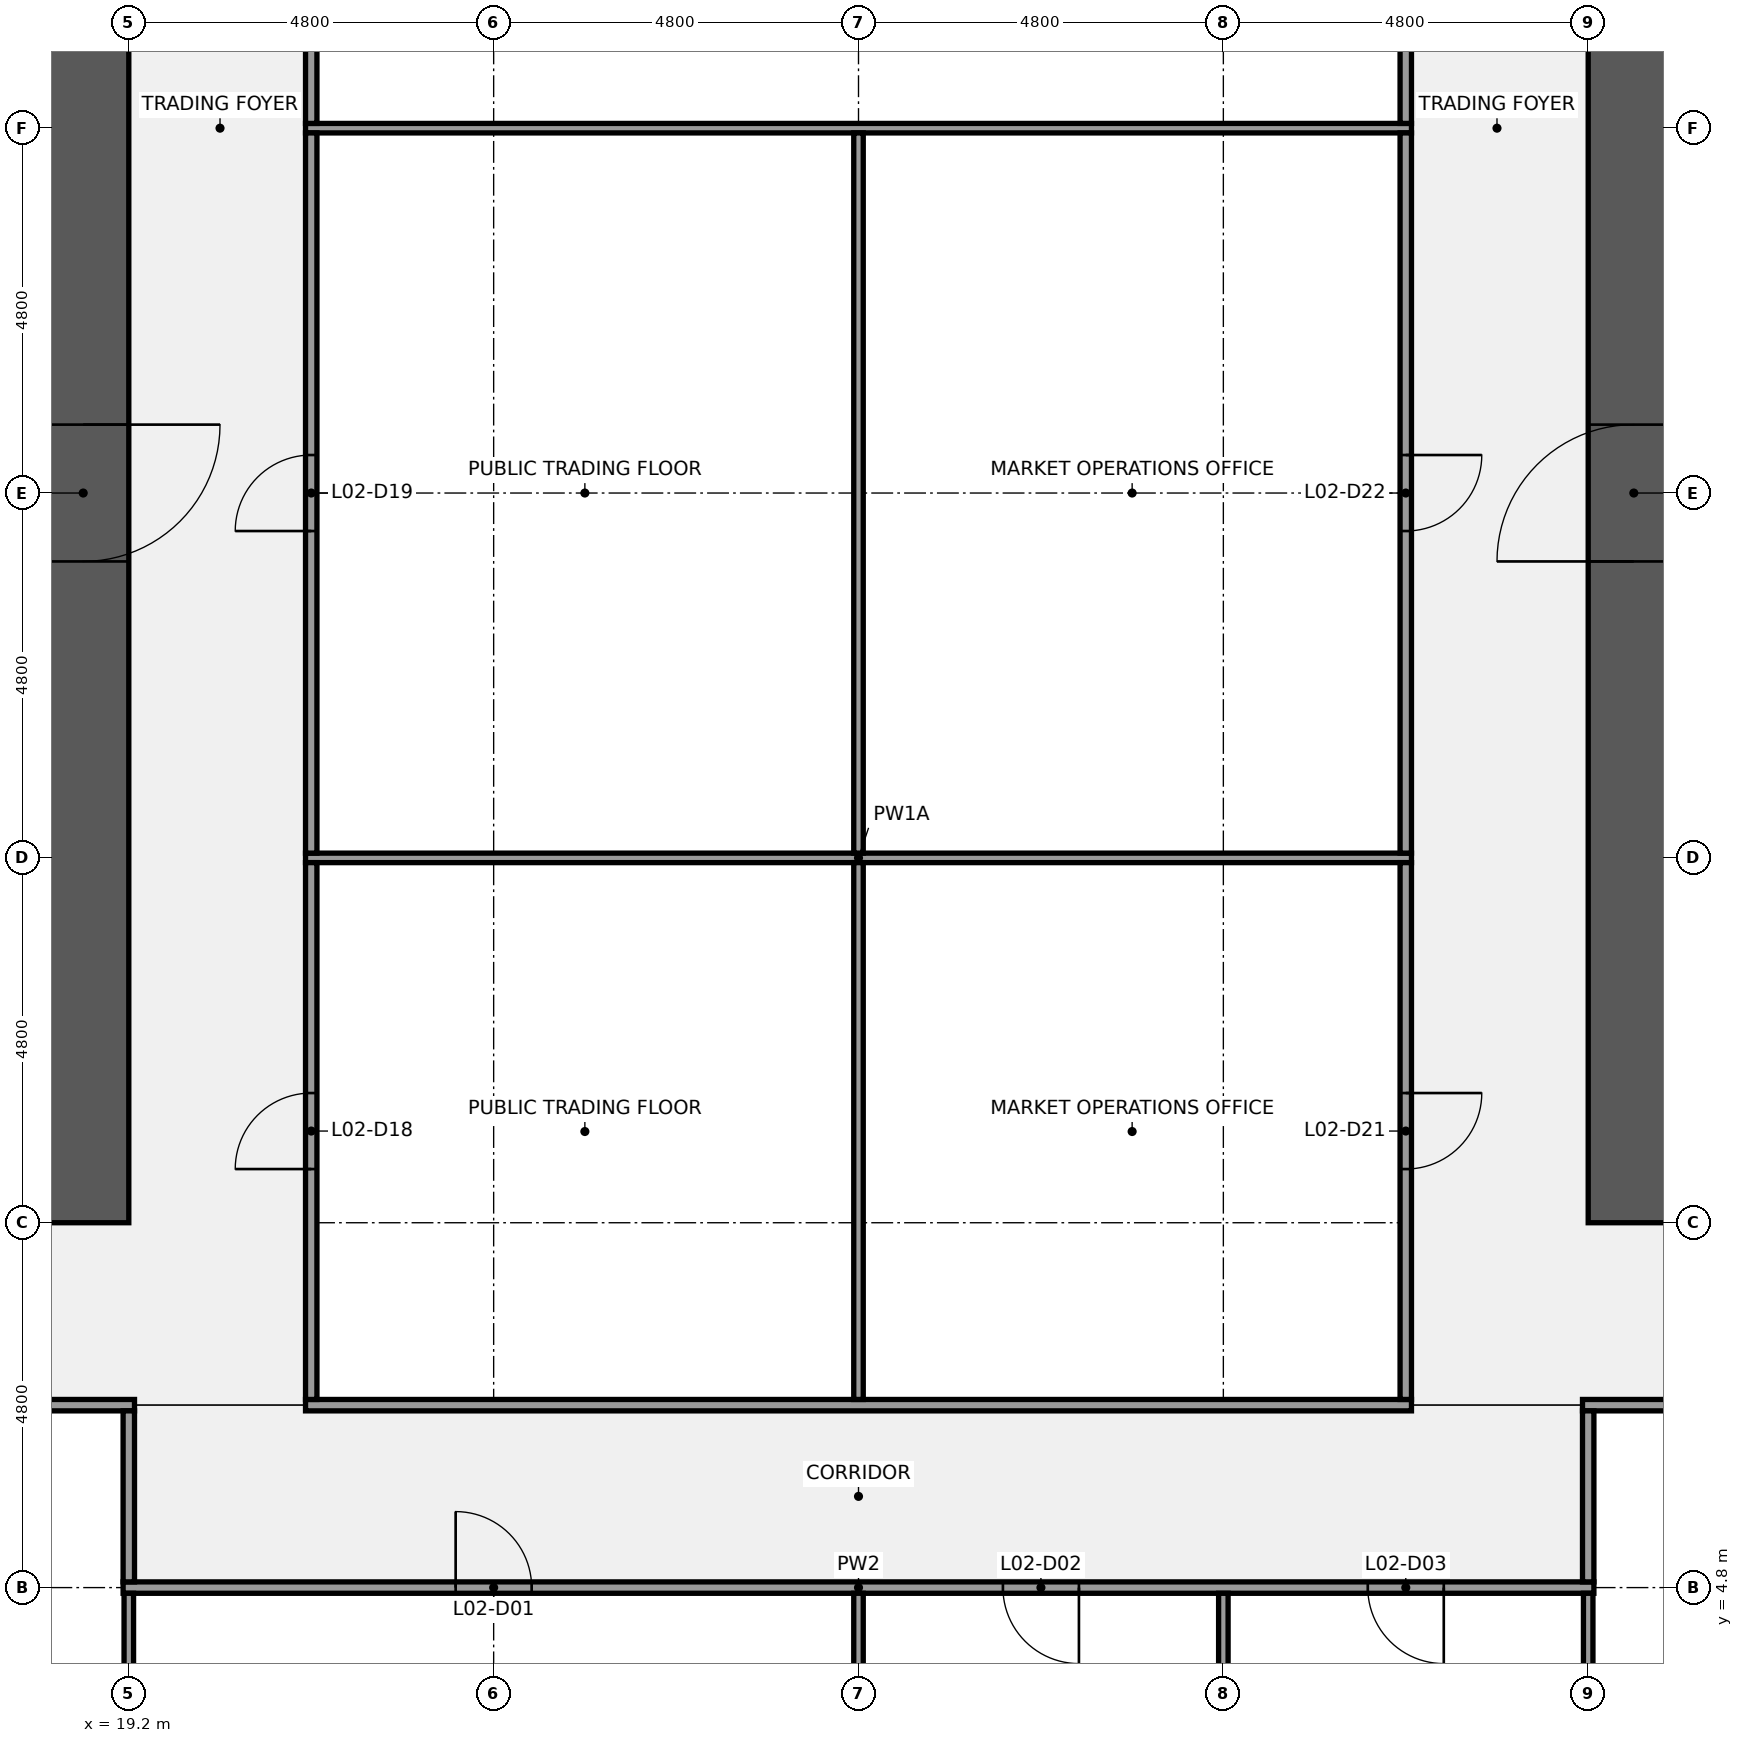
"""IFC4 building model, lengths in metres.
Left out: names, types, materials, properties, quantities, classifications, styles, units other than length and angle.
Written with IfcOpenShell. Run it as: python <this file> out.ifc"""

import sys

from ifc_helpers import new_model, si_unit, direction, frame, frame_2d, origin, place, context, subcontext, project, spatial, rectangle, extrude, element, fill, save


model = new_model("IFC4")
c1 = context("Model", 3, precision=1e-05, world=origin(), true_north=direction((0.0, 1.0)))
c2 = subcontext(c1, "Body", "Model", "MODEL_VIEW")
j1 = project(units=[si_unit("LENGTHUNIT", "METRE"), si_unit("PLANEANGLEUNIT", "RADIAN")], contexts=[c1])
p1 = place(None, origin())
s1 = spatial("IfcSite", under=j1, at=p1, CompositionType="ELEMENT")
p2 = place(p1, origin())
s2 = spatial("IfcBuilding", under=s1, at=p2, CompositionType="ELEMENT")
p3 = place(p2, frame((0.0, 0.0, 17.0)))
s3 = spatial("IfcBuildingStorey", under=s2, at=p3, CompositionType="ELEMENT", Elevation=17.0)
p4 = place(p3, frame((18.6, 38.4, 0.0), z_axis=(0.0, 0.0, 1.0), x_axis=(0.0, -1.0, 0.0)))
e1 = element("IfcWall", 1, at=p4, inside=s3, PredefinedType="SHEAR", context=c2, shape_type="SweptSolid", body=[
    extrude(rectangle(XDim=28.8, YDim=1.2, at=frame_2d((14.4, 0.0))), origin(), (0.0, 0.0, 1.0), 4.24),
])
p5 = place(p4, frame((18.3, 0.0, 0.0)))
e2 = element("IfcOpeningElement", 2, at=p5, cuts=e1, PredefinedType="OPENING", context=c2, shape_type="SweptSolid", body=[
    extrude(rectangle(XDim=1.8, YDim=2.1, at=frame_2d((0.9, 1.05))), frame((0.0, 0.61, 0.0), z_axis=(0.0, -1.0, 0.0), x_axis=(1.0, 0.0, 0.0)), (0.0, 0.0, 1.0), 1.22),
])
p6 = place(p4, frame((8.7, 0.0, 0.0)))
e3 = element("IfcOpeningElement", 3, at=p6, cuts=e1, PredefinedType="OPENING", context=c2, shape_type="SweptSolid", body=[
    extrude(rectangle(XDim=1.8, YDim=2.1, at=frame_2d((0.9, 1.05))), frame((0.0, 0.61, 0.0), z_axis=(0.0, -1.0, 0.0), x_axis=(1.0, 0.0, 0.0)), (0.0, 0.0, 1.0), 1.22),
])
p7 = place(p3, frame((39.0, 9.6, 0.0), z_axis=(0.0, 0.0, 1.0), x_axis=(0.0, 1.0, 0.0)))
e4 = element("IfcWall", 4, at=p7, inside=s3, PredefinedType="SHEAR", context=c2, shape_type="SweptSolid", body=[
    extrude(rectangle(XDim=28.8, YDim=1.2, at=frame_2d((14.4, 0.0))), origin(), (0.0, 0.0, 1.0), 4.24),
])
p8 = place(p7, frame((8.7, 0.0, 0.0)))
e5 = element("IfcOpeningElement", 5, at=p8, cuts=e4, PredefinedType="OPENING", context=c2, shape_type="SweptSolid", body=[
    extrude(rectangle(XDim=1.8, YDim=2.1, at=frame_2d((0.9, 1.05))), frame((0.0, 0.61, 0.0), z_axis=(0.0, -1.0, 0.0), x_axis=(1.0, 0.0, 0.0)), (0.0, 0.0, 1.0), 1.22),
])
p9 = place(p7, frame((18.3, 0.0, 0.0)))
e6 = element("IfcOpeningElement", 6, at=p9, cuts=e4, PredefinedType="OPENING", context=c2, shape_type="SweptSolid", body=[
    extrude(rectangle(XDim=1.8, YDim=2.1, at=frame_2d((0.9, 1.05))), frame((0.0, 0.61, 0.0), z_axis=(0.0, -1.0, 0.0), x_axis=(1.0, 0.0, 0.0)), (0.0, 0.0, 1.0), 1.22),
])
p10 = place(p3, frame((19.125, 4.8, 0.0), z_axis=(0.0, 0.0, 1.0), x_axis=(1.0, 0.0, 0.0)))
e7 = element("IfcWall", 7, at=p10, inside=s3, PredefinedType="PARTITIONING", context=c2, shape_type="SweptSolid", body=[
    extrude(rectangle(XDim=19.35, YDim=0.15, at=frame_2d((9.675, 0.0))), origin(), (0.0, 0.0, 1.0), 3.25),
])
p11 = place(p10, frame((4.375, 0.0, 0.0)))
e8 = element("IfcOpeningElement", 8, at=p11, cuts=e7, PredefinedType="OPENING", context=c2, shape_type="SweptSolid", body=[
    extrude(rectangle(XDim=1.0, YDim=2.1, at=frame_2d((0.5, 1.05))), frame((0.0, 0.085, 0.0), z_axis=(0.0, -1.0, 0.0), x_axis=(1.0, 0.0, 0.0)), (0.0, 0.0, 1.0), 0.17),
])
p12 = place(p10, frame((11.575, 0.0, 0.0)))
e9 = element("IfcOpeningElement", 9, at=p12, cuts=e7, PredefinedType="OPENING", context=c2, shape_type="SweptSolid", body=[
    extrude(rectangle(XDim=1.0, YDim=2.1, at=frame_2d((0.5, 1.05))), frame((0.0, 0.085, 0.0), z_axis=(0.0, -1.0, 0.0), x_axis=(1.0, 0.0, 0.0)), (0.0, 0.0, 1.0), 0.17),
])
p13 = place(p10, frame((16.375, 0.0, 0.0)))
e10 = element("IfcOpeningElement", 10, at=p13, cuts=e7, PredefinedType="OPENING", context=c2, shape_type="SweptSolid", body=[
    extrude(rectangle(XDim=1.0, YDim=2.1, at=frame_2d((0.5, 1.05))), frame((0.0, 0.085, 0.0), z_axis=(0.0, -1.0, 0.0), x_axis=(1.0, 0.0, 0.0)), (0.0, 0.0, 1.0), 0.17),
])
p14 = place(p3, frame((9.525, 7.2, 0.0), z_axis=(0.0, 0.0, 1.0), x_axis=(1.0, 0.0, 0.0)))
e11 = element("IfcWall", 11, at=p14, inside=s3, PredefinedType="PARTITIONING", context=c2, shape_type="SweptSolid", body=[
    extrude(rectangle(XDim=9.75, YDim=0.15, at=frame_2d((4.875, 0.0))), origin(), (0.0, 0.0, 1.0), 3.25),
])
p15 = place(p14, frame((4.375, 0.0, 0.0)))
e12 = element("IfcOpeningElement", 12, at=p15, cuts=e11, PredefinedType="OPENING", context=c2, shape_type="SweptSolid", body=[
    extrude(rectangle(XDim=1.0, YDim=2.1, at=frame_2d((0.5, 1.05))), frame((0.0, 0.085, 0.0), z_axis=(0.0, -1.0, 0.0), x_axis=(1.0, 0.0, 0.0)), (0.0, 0.0, 1.0), 0.17),
])
p16 = place(p3, frame((21.525, 7.2, 0.0), z_axis=(0.0, 0.0, 1.0), x_axis=(1.0, 0.0, 0.0)))
e13 = element("IfcWall", 13, at=p16, inside=s3, PredefinedType="PARTITIONING", context=c2, shape_type="SweptSolid", body=[
    extrude(rectangle(XDim=14.55, YDim=0.15, at=frame_2d((7.275, 0.0))), origin(), (0.0, 0.0, 1.0), 3.25),
])
p17 = place(p3, frame((38.325, 7.2, 0.0), z_axis=(0.0, 0.0, 1.0), x_axis=(1.0, 0.0, 0.0)))
e14 = element("IfcWall", 14, at=p17, inside=s3, PredefinedType="PARTITIONING", context=c2, shape_type="SweptSolid", body=[
    extrude(rectangle(XDim=9.75, YDim=0.15, at=frame_2d((4.875, 0.0))), origin(), (0.0, 0.0, 1.0), 3.25),
])
p18 = place(p17, frame((4.375, 0.0, 0.0)))
e15 = element("IfcOpeningElement", 15, at=p18, cuts=e14, PredefinedType="OPENING", context=c2, shape_type="SweptSolid", body=[
    extrude(rectangle(XDim=1.0, YDim=2.1, at=frame_2d((0.5, 1.05))), frame((0.0, 0.085, 0.0), z_axis=(0.0, -1.0, 0.0), x_axis=(1.0, 0.0, 0.0)), (0.0, 0.0, 1.0), 0.17),
])
for number, where, z_axis, x_axis in (
    (16, (21.525, 14.4, 0.0), (0.0, 0.0, 1.0), (1.0, 0.0, 0.0)),
    (17, (21.525, 24.0, 0.0), (0.0, 0.0, 1.0), (1.0, 0.0, 0.0)),
):
    element("IfcWall", number, at=place(p3, frame(where, z_axis=z_axis, x_axis=x_axis)), inside=s3, PredefinedType="PARTITIONING", context=c2, shape_type="SweptSolid", body=[
        extrude(rectangle(XDim=14.55, YDim=0.125, at=frame_2d((7.275, 0.0))), origin(), (0.0, 0.0, 1.0), 3.25),
    ])
p19 = place(p3, frame((19.2, 0.65, 0.0), z_axis=(0.0, 0.0, 1.0), x_axis=(0.0, 1.0, 0.0)))
e18 = element("IfcWall", 18, at=p19, inside=s3, PredefinedType="PARTITIONING", context=c2, shape_type="SweptSolid", body=[
    extrude(rectangle(XDim=4.075, YDim=0.125, at=frame_2d((2.038, 0.0))), origin(), (0.0, 0.0, 1.0), 3.25),
])
p20 = place(p3, frame((19.2, 4.875, 0.0), z_axis=(0.0, 0.0, 1.0), x_axis=(0.0, 1.0, 0.0)))
e19 = element("IfcWall", 19, at=p20, inside=s3, PredefinedType="PARTITIONING", context=c2, shape_type="SweptSolid", body=[
    extrude(rectangle(XDim=2.25, YDim=0.15, at=frame_2d((1.125, 0.0))), origin(), (0.0, 0.0, 1.0), 3.25),
])
p21 = place(p3, frame((21.6, 7.275, 0.0), z_axis=(0.0, 0.0, 1.0), x_axis=(0.0, 1.0, 0.0)))
e20 = element("IfcWall", 20, at=p21, inside=s3, PredefinedType="PARTITIONING", context=c2, shape_type="SweptSolid", body=[
    extrude(rectangle(XDim=7.062, YDim=0.15, at=frame_2d((3.531, 0.0))), origin(), (0.0, 0.0, 1.0), 3.25),
])
p22 = place(p21, frame((3.031, 0.0, 0.0)))
e21 = element("IfcOpeningElement", 21, at=p22, cuts=e20, PredefinedType="OPENING", context=c2, shape_type="SweptSolid", body=[
    extrude(rectangle(XDim=1.0, YDim=2.1, at=frame_2d((0.5, 1.05))), frame((0.0, 0.085, 0.0), z_axis=(0.0, -1.0, 0.0), x_axis=(1.0, 0.0, 0.0)), (0.0, 0.0, 1.0), 0.17),
])
p23 = place(p3, frame((21.6, 14.462, 0.0), z_axis=(0.0, 0.0, 1.0), x_axis=(0.0, 1.0, 0.0)))
e22 = element("IfcWall", 22, at=p23, inside=s3, PredefinedType="PARTITIONING", context=c2, shape_type="SweptSolid", body=[
    extrude(rectangle(XDim=9.475, YDim=0.15, at=frame_2d((4.738, 0.0))), origin(), (0.0, 0.0, 1.0), 3.25),
])
p24 = place(p23, frame((4.238, 0.0, 0.0)))
e23 = element("IfcOpeningElement", 23, at=p24, cuts=e22, PredefinedType="OPENING", context=c2, shape_type="SweptSolid", body=[
    extrude(rectangle(XDim=1.0, YDim=2.1, at=frame_2d((0.5, 1.05))), frame((0.0, 0.085, 0.0), z_axis=(0.0, -1.0, 0.0), x_axis=(1.0, 0.0, 0.0)), (0.0, 0.0, 1.0), 0.17),
])
p25 = place(p3, frame((21.6, 24.062, 0.0), z_axis=(0.0, 0.0, 1.0), x_axis=(0.0, 1.0, 0.0)))
e24 = element("IfcWall", 24, at=p25, inside=s3, PredefinedType="PARTITIONING", context=c2, shape_type="SweptSolid", body=[
    extrude(rectangle(XDim=9.475, YDim=0.15, at=frame_2d((4.738, 0.0))), origin(), (0.0, 0.0, 1.0), 3.25),
])
p26 = place(p25, frame((4.238, 0.0, 0.0)))
e25 = element("IfcOpeningElement", 25, at=p26, cuts=e24, PredefinedType="OPENING", context=c2, shape_type="SweptSolid", body=[
    extrude(rectangle(XDim=1.0, YDim=2.1, at=frame_2d((0.5, 1.05))), frame((0.0, 0.085, 0.0), z_axis=(0.0, -1.0, 0.0), x_axis=(1.0, 0.0, 0.0)), (0.0, 0.0, 1.0), 0.17),
])
p27 = place(p3, frame((28.8, 0.65, 0.0), z_axis=(0.0, 0.0, 1.0), x_axis=(0.0, 1.0, 0.0)))
e26 = element("IfcWall", 26, at=p27, inside=s3, PredefinedType="PARTITIONING", context=c2, shape_type="SweptSolid", body=[
    extrude(rectangle(XDim=4.075, YDim=0.125, at=frame_2d((2.038, 0.0))), origin(), (0.0, 0.0, 1.0), 3.25),
])
p28 = place(p3, frame((28.8, 7.275, 0.0), z_axis=(0.0, 0.0, 1.0), x_axis=(0.0, 1.0, 0.0)))
e27 = element("IfcWall", 27, at=p28, inside=s3, PredefinedType="PARTITIONING", context=c2, shape_type="SweptSolid", body=[
    extrude(rectangle(XDim=7.062, YDim=0.125, at=frame_2d((3.531, 0.0))), origin(), (0.0, 0.0, 1.0), 3.25),
])
p29 = place(p3, frame((28.8, 14.462, 0.0), z_axis=(0.0, 0.0, 1.0), x_axis=(0.0, 1.0, 0.0)))
e28 = element("IfcWall", 28, at=p29, inside=s3, PredefinedType="PARTITIONING", context=c2, shape_type="SweptSolid", body=[
    extrude(rectangle(XDim=9.475, YDim=0.125, at=frame_2d((4.738, 0.0))), origin(), (0.0, 0.0, 1.0), 3.25),
])
p30 = place(p3, frame((33.6, 0.1, 0.0), z_axis=(0.0, 0.0, 1.0), x_axis=(0.0, 1.0, 0.0)))
e29 = element("IfcWall", 29, at=p30, inside=s3, PredefinedType="PARTITIONING", context=c2, shape_type="SweptSolid", body=[
    extrude(rectangle(XDim=4.625, YDim=0.125, at=frame_2d((2.312, 0.0))), origin(), (0.0, 0.0, 1.0), 3.25),
])
p31 = place(p3, frame((36.0, 7.275, 0.0), z_axis=(0.0, 0.0, 1.0), x_axis=(0.0, 1.0, 0.0)))
e30 = element("IfcWall", 30, at=p31, inside=s3, PredefinedType="PARTITIONING", context=c2, shape_type="SweptSolid", body=[
    extrude(rectangle(XDim=7.062, YDim=0.15, at=frame_2d((3.531, 0.0))), origin(), (0.0, 0.0, 1.0), 3.25),
])
p32 = place(p31, frame((3.031, 0.0, 0.0)))
e31 = element("IfcOpeningElement", 31, at=p32, cuts=e30, PredefinedType="OPENING", context=c2, shape_type="SweptSolid", body=[
    extrude(rectangle(XDim=1.0, YDim=2.1, at=frame_2d((0.5, 1.05))), frame((0.0, 0.085, 0.0), z_axis=(0.0, -1.0, 0.0), x_axis=(1.0, 0.0, 0.0)), (0.0, 0.0, 1.0), 0.17),
])
p33 = place(p3, frame((36.0, 14.462, 0.0), z_axis=(0.0, 0.0, 1.0), x_axis=(0.0, 1.0, 0.0)))
e32 = element("IfcWall", 32, at=p33, inside=s3, PredefinedType="PARTITIONING", context=c2, shape_type="SweptSolid", body=[
    extrude(rectangle(XDim=9.475, YDim=0.15, at=frame_2d((4.738, 0.0))), origin(), (0.0, 0.0, 1.0), 3.25),
])
p34 = place(p33, frame((4.238, 0.0, 0.0)))
e33 = element("IfcOpeningElement", 33, at=p34, cuts=e32, PredefinedType="OPENING", context=c2, shape_type="SweptSolid", body=[
    extrude(rectangle(XDim=1.0, YDim=2.1, at=frame_2d((0.5, 1.05))), frame((0.0, 0.085, 0.0), z_axis=(0.0, -1.0, 0.0), x_axis=(1.0, 0.0, 0.0)), (0.0, 0.0, 1.0), 0.17),
])
p35 = place(p3, frame((36.0, 24.062, 0.0), z_axis=(0.0, 0.0, 1.0), x_axis=(0.0, 1.0, 0.0)))
e34 = element("IfcWall", 34, at=p35, inside=s3, PredefinedType="PARTITIONING", context=c2, shape_type="SweptSolid", body=[
    extrude(rectangle(XDim=9.475, YDim=0.15, at=frame_2d((4.738, 0.0))), origin(), (0.0, 0.0, 1.0), 3.25),
])
p36 = place(p3, frame((38.4, 0.65, 0.0), z_axis=(0.0, 0.0, 1.0), x_axis=(0.0, 1.0, 0.0)))
e35 = element("IfcWall", 35, at=p36, inside=s3, PredefinedType="PARTITIONING", context=c2, shape_type="SweptSolid", body=[
    extrude(rectangle(XDim=4.075, YDim=0.125, at=frame_2d((2.038, 0.0))), origin(), (0.0, 0.0, 1.0), 3.25),
])
p37 = place(p3, frame((38.4, 4.875, 0.0), z_axis=(0.0, 0.0, 1.0), x_axis=(0.0, 1.0, 0.0)))
e36 = element("IfcWall", 36, at=p37, inside=s3, PredefinedType="PARTITIONING", context=c2, shape_type="SweptSolid", body=[
    extrude(rectangle(XDim=2.25, YDim=0.15, at=frame_2d((1.125, 0.0))), origin(), (0.0, 0.0, 1.0), 3.25),
])
p38 = place(p5, origin())
e37 = element("IfcDoor", 37, at=p38, inside=s3, OperationType="DOUBLE_DOOR_SINGLE_SWING", PredefinedType="DOOR", context=c2, shape_type="SweptSolid", body=[
    extrude(rectangle(XDim=1.8, YDim=2.1, at=frame_2d((0.9, 1.05))), frame((0.0, 0.025, 0.0), z_axis=(0.0, -1.0, 0.0), x_axis=(1.0, 0.0, 0.0)), (0.0, 0.0, 1.0), 0.05),
])
fill(e2, e37)
p39 = place(p8, origin())
e38 = element("IfcDoor", 38, at=p39, inside=s3, OperationType="DOUBLE_DOOR_SINGLE_SWING", PredefinedType="DOOR", context=c2, shape_type="SweptSolid", body=[
    extrude(rectangle(XDim=1.8, YDim=2.1, at=frame_2d((0.9, 1.05))), frame((0.0, 0.025, 0.0), z_axis=(0.0, -1.0, 0.0), x_axis=(1.0, 0.0, 0.0)), (0.0, 0.0, 1.0), 0.05),
])
fill(e5, e38)
p40 = place(p11, origin())
e39 = element("IfcDoor", 39, at=p40, inside=s3, OperationType="SINGLE_SWING_LEFT", PredefinedType="DOOR", context=c2, shape_type="SweptSolid", body=[
    extrude(rectangle(XDim=1.0, YDim=2.1, at=frame_2d((0.5, 1.05))), frame((0.0, 0.025, 0.0), z_axis=(0.0, -1.0, 0.0), x_axis=(1.0, 0.0, 0.0)), (0.0, 0.0, 1.0), 0.05),
])
fill(e8, e39)
p41 = place(p12, origin())
e40 = element("IfcDoor", 40, at=p41, inside=s3, OperationType="SINGLE_SWING_RIGHT", PredefinedType="DOOR", context=c2, shape_type="SweptSolid", body=[
    extrude(rectangle(XDim=1.0, YDim=2.1, at=frame_2d((0.5, 1.05))), frame((0.0, 0.025, 0.0), z_axis=(0.0, -1.0, 0.0), x_axis=(1.0, 0.0, 0.0)), (0.0, 0.0, 1.0), 0.05),
])
fill(e9, e40)
p42 = place(p13, origin())
e41 = element("IfcDoor", 41, at=p42, inside=s3, OperationType="SINGLE_SWING_RIGHT", PredefinedType="DOOR", context=c2, shape_type="SweptSolid", body=[
    extrude(rectangle(XDim=1.0, YDim=2.1, at=frame_2d((0.5, 1.05))), frame((0.0, 0.025, 0.0), z_axis=(0.0, -1.0, 0.0), x_axis=(1.0, 0.0, 0.0)), (0.0, 0.0, 1.0), 0.05),
])
fill(e10, e41)
p43 = place(p22, origin())
e42 = element("IfcDoor", 42, at=p43, inside=s3, OperationType="SINGLE_SWING_LEFT", PredefinedType="DOOR", context=c2, shape_type="SweptSolid", body=[
    extrude(rectangle(XDim=1.0, YDim=2.1, at=frame_2d((0.5, 1.05))), frame((0.0, 0.025, 0.0), z_axis=(0.0, -1.0, 0.0), x_axis=(1.0, 0.0, 0.0)), (0.0, 0.0, 1.0), 0.05),
])
fill(e21, e42)
p44 = place(p24, origin())
e43 = element("IfcDoor", 43, at=p44, inside=s3, OperationType="SINGLE_SWING_LEFT", PredefinedType="DOOR", context=c2, shape_type="SweptSolid", body=[
    extrude(rectangle(XDim=1.0, YDim=2.1, at=frame_2d((0.5, 1.05))), frame((0.0, 0.025, 0.0), z_axis=(0.0, -1.0, 0.0), x_axis=(1.0, 0.0, 0.0)), (0.0, 0.0, 1.0), 0.05),
])
fill(e23, e43)
p45 = place(p32, origin())
e44 = element("IfcDoor", 44, at=p45, inside=s3, OperationType="SINGLE_SWING_RIGHT", PredefinedType="DOOR", context=c2, shape_type="SweptSolid", body=[
    extrude(rectangle(XDim=1.0, YDim=2.1, at=frame_2d((0.5, 1.05))), frame((0.0, 0.025, 0.0), z_axis=(0.0, -1.0, 0.0), x_axis=(1.0, 0.0, 0.0)), (0.0, 0.0, 1.0), 0.05),
])
fill(e31, e44)
p46 = place(p34, origin())
e45 = element("IfcDoor", 45, at=p46, inside=s3, OperationType="SINGLE_SWING_RIGHT", PredefinedType="DOOR", context=c2, shape_type="SweptSolid", body=[
    extrude(rectangle(XDim=1.0, YDim=2.1, at=frame_2d((0.5, 1.05))), frame((0.0, 0.025, 0.0), z_axis=(0.0, -1.0, 0.0), x_axis=(1.0, 0.0, 0.0)), (0.0, 0.0, 1.0), 0.05),
])
fill(e33, e45)
save(model, sys.argv[1])
